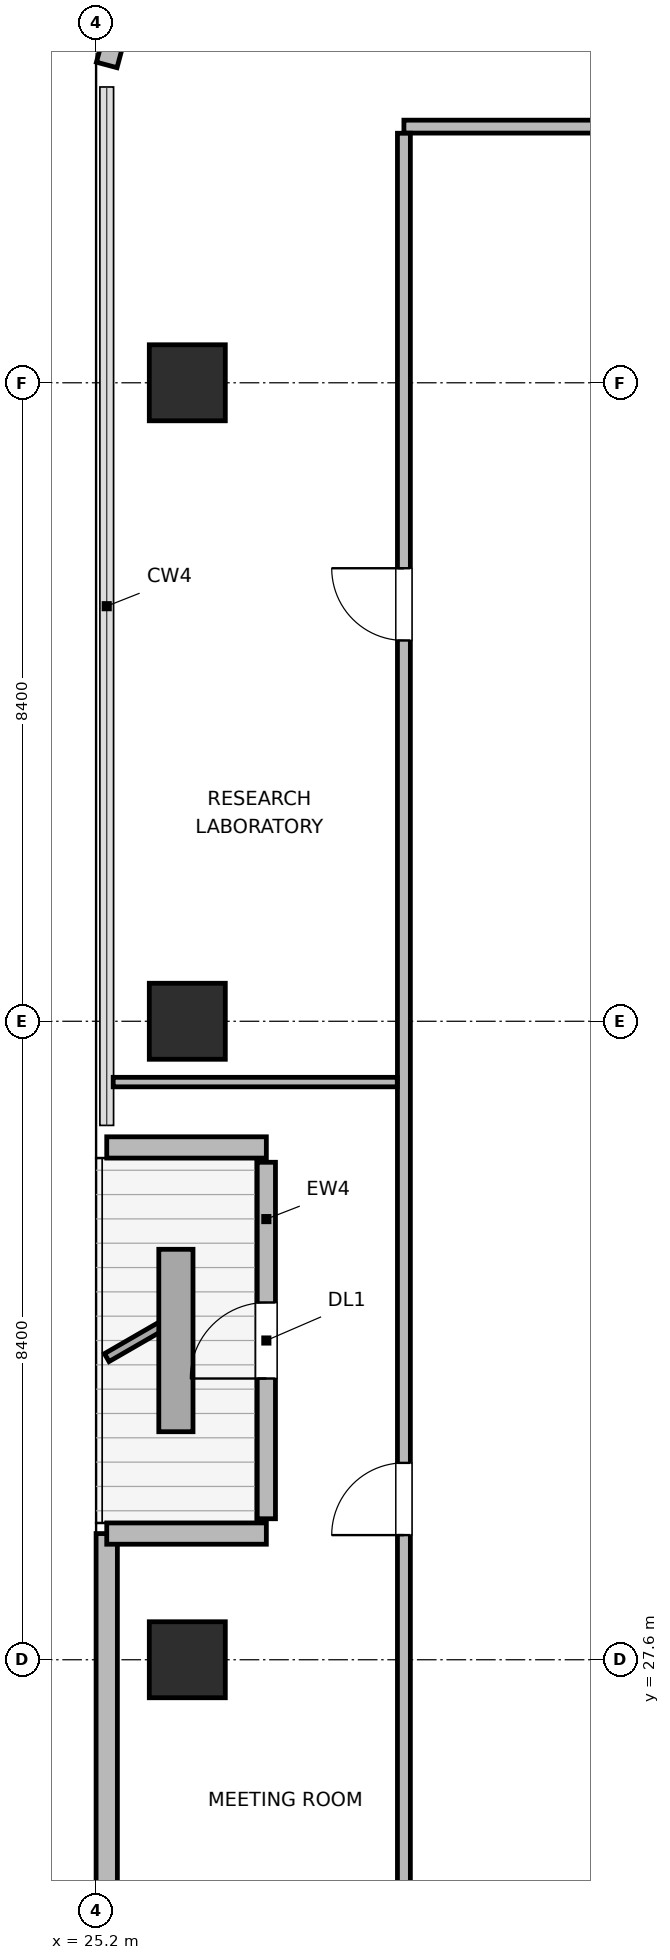
"""IFC4 building model, lengths in metres.
Left out: names, types, materials, properties, quantities, classifications, styles, units other than length and angle.
Written with IfcOpenShell. Run it as: python <this file> out.ifc"""

import sys

from ifc_helpers import new_model, si_unit, direction, frame, frame_2d, origin, origin_2d, place, context, subcontext, project, spatial, rectangle, extrude, element, fill, save


model = new_model("IFC4")
c1 = context("Model", 3, precision=1e-05, world=origin(), true_north=direction((0.0, 1.0)))
c2 = subcontext(c1, "Body", "Model", "MODEL_VIEW")
j1 = project(units=[si_unit("LENGTHUNIT", "METRE"), si_unit("PLANEANGLEUNIT", "RADIAN")], contexts=[c1])
p1 = place(None, origin())
s1 = spatial("IfcSite", under=j1, at=p1, CompositionType="ELEMENT")
p2 = place(p1, origin())
s2 = spatial("IfcBuilding", under=s1, at=p2, CompositionType="ELEMENT")
p3 = place(p2, frame((0.0, 0.0, 290.1)))
s3 = spatial("IfcBuildingStorey", under=s2, at=p3, CompositionType="ELEMENT", Elevation=290.1)
for number, where, z_axis, x_axis in (
    (1, (26.4, 27.6, 0.0), (0.0, 0.0, 1.0), (1.0, 0.0, 0.0)),
    (2, (26.4, 36.0, 0.0), (0.0, 0.0, 1.0), (1.0, 0.0, 0.0)),
    (3, (26.4, 44.4, 0.0), (0.0, 0.0, 1.0), (1.0, 0.0, 0.0)),
):
    element("IfcColumn", number, at=place(p3, frame(where, z_axis=z_axis, x_axis=x_axis)), inside=s3, PredefinedType="COLUMN", context=c2, shape_type="SweptSolid", body=[
        extrude(rectangle(XDim=1.0, YDim=1.0, at=origin_2d()), origin(), (0.0, 0.0, 1.0), 3.9),
    ])
p4 = place(p3, frame((25.34, 23.418, 0.0), z_axis=(0.0, 0.0, 1.0), x_axis=(0.0, 1.0, 0.0)))
e4 = element("IfcWall", 4, at=p4, inside=s3, PredefinedType="SOLIDWALL", context=c2, shape_type="SweptSolid", body=[
    extrude(rectangle(XDim=5.842, YDim=0.28, at=frame_2d((2.921, 0.0))), origin(), (0.0, 0.0, 1.0), 3.68),
])
p5 = place(p3, frame((25.34, 29.26, 0.0), z_axis=(0.0, 0.0, 1.0), x_axis=(1.0, 0.0, 0.0)))
e5 = element("IfcWall", 5, at=p5, inside=s3, PredefinedType="SOLIDWALL", context=c2, shape_type="SweptSolid", body=[
    extrude(rectangle(XDim=2.1, YDim=0.28, at=frame_2d((1.05, 0.0))), origin(), (0.0, 0.0, 1.0), 3.126),
])
p6 = place(p3, frame((27.44, 29.455, 0.0), z_axis=(0.0, 0.0, 1.0), x_axis=(0.0, 1.0, 0.0)))
e6 = element("IfcWall", 6, at=p6, inside=s3, PredefinedType="SOLIDWALL", context=c2, shape_type="SweptSolid", body=[
    extrude(rectangle(XDim=4.69, YDim=0.24, at=frame_2d((2.345, 0.0))), origin(), (0.0, 0.0, 1.0), 3.311),
])
p7 = place(p6, frame((1.845, 0.0, 0.0)))
e7 = element("IfcOpeningElement", 7, at=p7, cuts=e6, PredefinedType="OPENING", context=c2, shape_type="SweptSolid", body=[
    extrude(rectangle(XDim=1.0, YDim=2.02, at=frame_2d((0.5, 1.01))), frame((0.0, 0.13, 0.0), z_axis=(0.0, -1.0, 0.0), x_axis=(1.0, 0.0, 0.0)), (0.0, 0.0, 1.0), 0.26),
])
p8 = place(p3, frame((27.44, 34.34, 0.0), z_axis=(0.0, 0.0, 1.0), x_axis=(-1.0, 0.0, 0.0)))
e8 = element("IfcWall", 8, at=p8, inside=s3, PredefinedType="SOLIDWALL", context=c2, shape_type="SweptSolid", body=[
    extrude(rectangle(XDim=2.1, YDim=0.28, at=frame_2d((1.05, 0.0))), origin(), (0.0, 0.0, 1.0), 3.126),
])
p9 = place(p3, frame((25.34, 48.582, 0.0), z_axis=(0.0, 0.0, 1.0), x_axis=(0.258751159445, 0.965944013639, 0.0)))
e9 = element("IfcWall", 9, at=p9, inside=s3, PredefinedType="SOLIDWALL", context=c2, shape_type="SweptSolid", body=[
    extrude(rectangle(XDim=2.429, YDim=0.28, at=frame_2d((1.214, 0.0))), origin(), (0.0, 0.0, 1.0), 3.68),
])
p10 = place(p3, frame((29.25, 47.77, 0.0), z_axis=(0.0, 0.0, 1.0), x_axis=(1.0, 0.0, 0.0)))
e10 = element("IfcWall", 10, at=p10, inside=s3, PredefinedType="PARTITIONING", context=c2, shape_type="SweptSolid", body=[
    extrude(rectangle(XDim=34.35, YDim=0.17, at=frame_2d((17.175, 0.0))), origin(), (0.0, 0.0, 1.0), 3.68),
])
p11 = place(p10, frame((8.4, 0.0, 0.0)))
e11 = element("IfcOpeningElement", 11, at=p11, cuts=e10, PredefinedType="OPENING", context=c2, shape_type="SweptSolid", body=[
    extrude(rectangle(XDim=0.95, YDim=2.04, at=frame_2d((0.475, 1.02))), frame((0.0, 0.095, 0.0), z_axis=(0.0, -1.0, 0.0), x_axis=(1.0, 0.0, 0.0)), (0.0, 0.0, 1.0), 0.19),
])
p12 = place(p10, frame((25.575, 0.0, 0.0)))
e12 = element("IfcOpeningElement", 12, at=p12, cuts=e10, PredefinedType="OPENING", context=c2, shape_type="SweptSolid", body=[
    extrude(rectangle(XDim=0.95, YDim=2.04, at=frame_2d((0.475, 1.02))), frame((0.0, 0.095, 0.0), z_axis=(0.0, -1.0, 0.0), x_axis=(1.0, 0.0, 0.0)), (0.0, 0.0, 1.0), 0.19),
])
p13 = place(p3, frame((29.25, 24.317, 0.0), z_axis=(0.0, 0.0, 1.0), x_axis=(0.0, 1.0, 0.0)))
e13 = element("IfcWall", 13, at=p13, inside=s3, PredefinedType="PARTITIONING", context=c2, shape_type="SweptSolid", body=[
    extrude(rectangle(XDim=23.366, YDim=0.17, at=frame_2d((11.683, 0.0))), origin(), (0.0, 0.0, 1.0), 3.68),
])
p14 = place(p13, frame((4.923, 0.0, 0.0)))
e14 = element("IfcOpeningElement", 14, at=p14, cuts=e13, PredefinedType="OPENING", context=c2, shape_type="SweptSolid", body=[
    extrude(rectangle(XDim=0.95, YDim=2.04, at=frame_2d((0.475, 1.02))), frame((0.0, 0.095, 0.0), z_axis=(0.0, -1.0, 0.0), x_axis=(1.0, 0.0, 0.0)), (0.0, 0.0, 1.0), 0.19),
])
p15 = place(p13, frame((16.693, 0.0, 0.0)))
e15 = element("IfcOpeningElement", 15, at=p15, cuts=e13, PredefinedType="OPENING", context=c2, shape_type="SweptSolid", body=[
    extrude(rectangle(XDim=0.95, YDim=2.04, at=frame_2d((0.475, 1.02))), frame((0.0, 0.095, 0.0), z_axis=(0.0, -1.0, 0.0), x_axis=(1.0, 0.0, 0.0)), (0.0, 0.0, 1.0), 0.19),
])
p16 = place(p3, frame((25.425, 35.2, 0.0), z_axis=(0.0, 0.0, 1.0), x_axis=(1.0, 0.0, 0.0)))
e16 = element("IfcWall", 16, at=p16, inside=s3, PredefinedType="PARTITIONING", context=c2, shape_type="SweptSolid", body=[
    extrude(rectangle(XDim=3.738, YDim=0.125, at=frame_2d((1.869, 0.0))), origin(), (0.0, 0.0, 1.0), 3.68),
])
p17 = place(p7, origin())
e17 = element("IfcDoor", 17, at=p17, inside=s3, OperationType="SINGLE_SWING_LEFT", PredefinedType="DOOR", context=c2, shape_type="SweptSolid", body=[
    extrude(rectangle(XDim=1.0, YDim=2.02, at=frame_2d((0.5, 1.01))), frame((0.0, 0.025, 0.0), z_axis=(0.0, -1.0, 0.0), x_axis=(1.0, 0.0, 0.0)), (0.0, 0.0, 1.0), 0.05),
])
fill(e7, e17)
p18 = place(p14, origin())
e18 = element("IfcDoor", 18, at=p18, inside=s3, OperationType="SINGLE_SWING_LEFT", PredefinedType="DOOR", context=c2, shape_type="SweptSolid", body=[
    extrude(rectangle(XDim=0.95, YDim=2.04, at=frame_2d((0.475, 1.02))), frame((0.0, 0.025, 0.0), z_axis=(0.0, -1.0, 0.0), x_axis=(1.0, 0.0, 0.0)), (0.0, 0.0, 1.0), 0.05),
])
fill(e14, e18)
p19 = place(p15, origin())
e19 = element("IfcDoor", 19, at=p19, inside=s3, OperationType="SINGLE_SWING_RIGHT", PredefinedType="DOOR", context=c2, shape_type="SweptSolid", body=[
    extrude(rectangle(XDim=0.95, YDim=2.04, at=frame_2d((0.475, 1.02))), frame((0.0, 0.025, 0.0), z_axis=(0.0, -1.0, 0.0), x_axis=(1.0, 0.0, 0.0)), (0.0, 0.0, 1.0), 0.05),
])
fill(e15, e19)
save(model, sys.argv[1])
